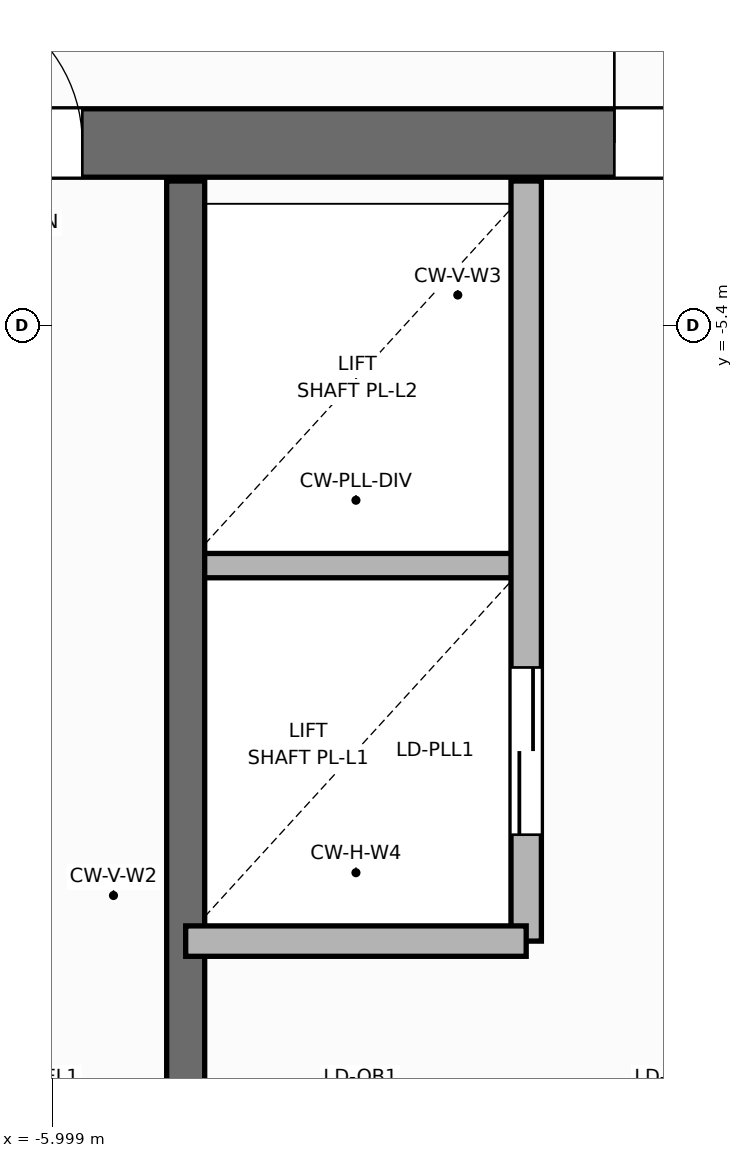
"""IFC4 building model, lengths in metres.
Left out: names, types, materials, properties, quantities, classifications, styles, units other than length and angle.
Written with IfcOpenShell. Run it as: python <this file> out.ifc"""

import sys

from ifc_helpers import new_model, si_unit, direction, frame, frame_2d, origin, place, context, subcontext, project, spatial, rectangle, extrude, element, fill, save


model = new_model("IFC4")
c1 = context("Model", 3, precision=1e-05, world=origin(), true_north=direction((0.0, 1.0)))
c2 = subcontext(c1, "Body", "Model", "MODEL_VIEW")
j1 = project(units=[si_unit("LENGTHUNIT", "METRE"), si_unit("PLANEANGLEUNIT", "RADIAN")], contexts=[c1])
p1 = place(None, origin())
s1 = spatial("IfcSite", under=j1, at=p1, CompositionType="ELEMENT")
p2 = place(p1, origin())
s2 = spatial("IfcBuilding", under=s1, at=p2, CompositionType="ELEMENT")
p3 = place(p2, frame((0.0, 0.0, 90.0)))
s3 = spatial("IfcBuildingStorey", under=s2, at=p3, CompositionType="ELEMENT", Elevation=90.0)
p4 = place(p3, frame((-5.12, -6.98, 0.0), z_axis=(0.0, 0.0, 1.0), x_axis=(1.0, 0.0, 0.0)))
e1 = element("IfcWall", 1, at=p4, inside=s3, PredefinedType="PARTITIONING", context=c2, shape_type="SweptSolid", body=[
    extrude(rectangle(XDim=2.24, YDim=0.16, at=frame_2d((1.12, 0.0))), origin(), (0.0, 0.0, 1.0), 4.52),
])
p5 = place(p3, frame((-12.65, -4.2, 0.0), z_axis=(0.0, 0.0, 1.0), x_axis=(1.0, 0.0, 0.0)))
e2 = element("IfcWall", 2, at=p5, inside=s3, PredefinedType="SHEAR", context=c2, shape_type="SweptSolid", body=[
    extrude(rectangle(XDim=25.3, YDim=0.45, at=frame_2d((12.65, 0.0))), origin(), (0.0, 0.0, 1.0), 4.8),
])
p6 = place(p5, frame((0.95, 0.0, 0.0)))
e3 = element("IfcOpeningElement", 3, at=p6, cuts=e2, PredefinedType="OPENING", context=c2, shape_type="SweptSolid", body=[
    extrude(rectangle(XDim=0.756, YDim=2.054, at=frame_2d((0.375, 1.027))), frame((0.0, 0.235, 0.0), z_axis=(0.0, -1.0, 0.0), x_axis=(1.0, 0.0, 0.0)), (0.0, 0.0, 1.0), 0.47),
])
p7 = place(p5, frame((2.6, 0.0, 0.0)))
e4 = element("IfcOpeningElement", 4, at=p7, cuts=e2, PredefinedType="OPENING", context=c2, shape_type="SweptSolid", body=[
    extrude(rectangle(XDim=0.756, YDim=2.054, at=frame_2d((0.375, 1.027))), frame((0.0, 0.235, 0.0), z_axis=(0.0, -1.0, 0.0), x_axis=(1.0, 0.0, 0.0)), (0.0, 0.0, 1.0), 0.47),
])
p8 = place(p5, frame((21.85, 0.0, 0.0)))
e5 = element("IfcOpeningElement", 5, at=p8, cuts=e2, PredefinedType="OPENING", context=c2, shape_type="SweptSolid", body=[
    extrude(rectangle(XDim=0.756, YDim=2.054, at=frame_2d((0.375, 1.027))), frame((0.0, 0.235, 0.0), z_axis=(0.0, -1.0, 0.0), x_axis=(1.0, 0.0, 0.0)), (0.0, 0.0, 1.0), 0.47),
])
p9 = place(p5, frame((23.5, 0.0, 0.0)))
e6 = element("IfcOpeningElement", 6, at=p9, cuts=e2, PredefinedType="OPENING", context=c2, shape_type="SweptSolid", body=[
    extrude(rectangle(XDim=0.756, YDim=2.054, at=frame_2d((0.375, 1.027))), frame((0.0, 0.235, 0.0), z_axis=(0.0, -1.0, 0.0), x_axis=(1.0, 0.0, 0.0)), (0.0, 0.0, 1.0), 0.47),
])
p10 = place(p5, frame((5.85, 0.0, 0.0)))
e7 = element("IfcOpeningElement", 7, at=p10, cuts=e2, PredefinedType="OPENING", context=c2, shape_type="SweptSolid", body=[
    extrude(rectangle(XDim=1.006, YDim=2.104, at=frame_2d((0.5, 1.052))), frame((0.0, 0.235, 0.0), z_axis=(0.0, -1.0, 0.0), x_axis=(1.0, 0.0, 0.0)), (0.0, 0.0, 1.0), 0.47),
])
p11 = place(p5, frame((10.35, 0.0, 0.0)))
e8 = element("IfcOpeningElement", 8, at=p11, cuts=e2, PredefinedType="OPENING", context=c2, shape_type="SweptSolid", body=[
    extrude(rectangle(XDim=1.406, YDim=2.154, at=frame_2d((0.7, 1.077))), frame((0.0, 0.235, 0.0), z_axis=(0.0, -1.0, 0.0), x_axis=(1.0, 0.0, 0.0)), (0.0, 0.0, 1.0), 0.47),
])
p12 = place(p5, frame((18.45, 0.0, 0.0)))
e9 = element("IfcOpeningElement", 9, at=p12, cuts=e2, PredefinedType="OPENING", context=c2, shape_type="SweptSolid", body=[
    extrude(rectangle(XDim=1.006, YDim=2.104, at=frame_2d((0.5, 1.052))), frame((0.0, 0.235, 0.0), z_axis=(0.0, -1.0, 0.0), x_axis=(1.0, 0.0, 0.0)), (0.0, 0.0, 1.0), 0.47),
])
p13 = place(p3, frame((-5.12, -13.85, 0.0), z_axis=(0.0, 0.0, 1.0), x_axis=(0.0, 1.0, 0.0)))
e10 = element("IfcWall", 10, at=p13, inside=s3, PredefinedType="SHEAR", context=c2, shape_type="SweptSolid", body=[
    extrude(rectangle(XDim=9.4, YDim=0.25, at=frame_2d((4.7, 0.0))), origin(), (0.0, 0.0, 1.0), 4.8),
])
p14 = place(p3, frame((-2.88, -9.45, 0.0), z_axis=(0.0, 0.0, 1.0), x_axis=(0.0, 1.0, 0.0)))
e11 = element("IfcWall", 11, at=p14, inside=s3, PredefinedType="SOLIDWALL", context=c2, shape_type="SweptSolid", body=[
    extrude(rectangle(XDim=5.0, YDim=0.2, at=frame_2d((2.5, 0.0))), origin(), (0.0, 0.0, 1.0), 4.52),
])
p15 = place(p14, frame((0.7, 0.0, 0.0)))
e12 = element("IfcOpeningElement", 12, at=p15, cuts=e11, PredefinedType="OPENING", context=c2, shape_type="SweptSolid", body=[
    extrude(rectangle(XDim=1.106, YDim=2.104, at=frame_2d((0.55, 1.052))), frame((0.0, 0.11, 0.0), z_axis=(0.0, -1.0, 0.0), x_axis=(1.0, 0.0, 0.0)), (0.0, 0.0, 1.0), 0.22),
])
p16 = place(p3, frame((-5.12, -9.45, 0.0), z_axis=(0.0, 0.0, 1.0), x_axis=(1.0, 0.0, 0.0)))
e13 = element("IfcWall", 13, at=p16, inside=s3, PredefinedType="SOLIDWALL", context=c2, shape_type="SweptSolid", body=[
    extrude(rectangle(XDim=2.24, YDim=0.2, at=frame_2d((1.12, 0.0))), origin(), (0.0, 0.0, 1.0), 4.52),
])
p17 = place(p15, origin())
e14 = element("IfcDoor", 14, at=p17, inside=s3, OperationType="DOUBLE_DOOR_SLIDING", PredefinedType="DOOR", context=c2, shape_type="SweptSolid", body=[
    extrude(rectangle(XDim=1.1, YDim=2.1, at=frame_2d((0.55, 1.05))), frame((0.0, 0.025, 0.0), z_axis=(0.0, -1.0, 0.0), x_axis=(1.0, 0.0, 0.0)), (0.0, 0.0, 1.0), 0.05),
])
fill(e12, e14)
p18 = place(p10, origin())
e15 = element("IfcDoor", 15, at=p18, inside=s3, OperationType="SINGLE_SWING_LEFT", PredefinedType="DOOR", context=c2, shape_type="SweptSolid", body=[
    extrude(rectangle(XDim=1.0, YDim=2.1, at=frame_2d((0.5, 1.05))), frame((0.0, 0.025, 0.0), z_axis=(0.0, -1.0, 0.0), x_axis=(1.0, 0.0, 0.0)), (0.0, 0.0, 1.0), 0.05),
])
fill(e7, e15)
p19 = place(p11, origin())
e16 = element("IfcDoor", 16, at=p19, inside=s3, OperationType="DOUBLE_DOOR_SINGLE_SWING", PredefinedType="DOOR", context=c2, shape_type="SweptSolid", body=[
    extrude(rectangle(XDim=1.4, YDim=2.15, at=frame_2d((0.7, 1.075))), frame((0.0, 0.025, 0.0), z_axis=(0.0, -1.0, 0.0), x_axis=(1.0, 0.0, 0.0)), (0.0, 0.0, 1.0), 0.05),
])
fill(e8, e16)
save(model, sys.argv[1])
